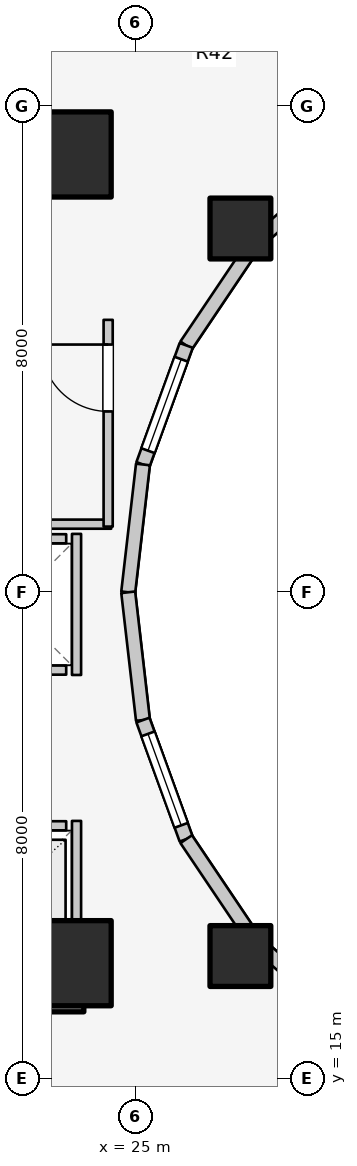
"""IFC4 building model, lengths in metres.
Left out: names, types, materials, properties, quantities, classifications, styles, units other than length and angle.
Written with IfcOpenShell. Run it as: python <this file> out.ifc"""

import sys

from ifc_helpers import new_model, si_unit, direction, frame, frame_2d, origin, origin_2d, place, context, subcontext, project, spatial, rectangle, extrude, element, fill, save


model = new_model("IFC4")
c1 = context("Model", 3, precision=1e-05, world=origin(), true_north=direction((0.0, 1.0)))
c2 = subcontext(c1, "Body", "Model", "MODEL_VIEW")
j1 = project(units=[si_unit("LENGTHUNIT", "METRE"), si_unit("PLANEANGLEUNIT", "RADIAN")], contexts=[c1])
p1 = place(None, origin())
s1 = spatial("IfcSite", under=j1, at=p1, CompositionType="ELEMENT")
p2 = place(p1, origin())
s2 = spatial("IfcBuilding", under=s1, at=p2, CompositionType="ELEMENT")
p3 = place(p2, frame((0.0, 0.0, 40.0)))
s3 = spatial("IfcBuildingStorey", under=s2, at=p3, CompositionType="ELEMENT", Elevation=40.0)
for number, where, z_axis, x_axis in (
    (1, (19.65, 16.55, 0.0), (0.0, 0.0, 1.0), (1.0, 0.0, 0.0)),
    (2, (19.65, 30.35, 0.0), (0.0, 0.0, 1.0), (1.0, 0.0, 0.0)),
):
    element("IfcWall", number, at=place(p3, frame(where, z_axis=z_axis, x_axis=x_axis)), inside=s3, PredefinedType="SHEAR", context=c2, shape_type="SweptSolid", body=[
        extrude(rectangle(XDim=4.5, YDim=0.9, at=frame_2d((2.25, 0.0))), origin(), (0.0, 0.0, 1.0), 3.1),
    ])
for number, where, z_axis, x_axis in (
    (3, (23.9, 16.9, 0.0), (0.0, 0.0, 1.0), (1.0, 0.0, 0.0)),
    (4, (23.9, 30.2, 0.0), (0.0, 0.0, 1.0), (1.0, 0.0, 0.0)),
):
    element("IfcColumn", number, at=place(p3, frame(where, z_axis=z_axis, x_axis=x_axis)), inside=s3, PredefinedType="COLUMN", context=c2, shape_type="SweptSolid", body=[
        extrude(rectangle(XDim=1.4, YDim=1.4, at=origin_2d()), origin(), (0.0, 0.0, 1.0), 3.1),
    ])
for number, where, z_axis, x_axis in (
    (5, (26.725, 28.982, 0.0), (0.0, 0.0, 1.0), (1.0, 0.0, 0.0)),
    (6, (26.725, 17.018, 0.0), (0.0, 0.0, 1.0), (1.0, 0.0, 0.0)),
):
    element("IfcColumn", number, at=place(p3, frame(where, z_axis=z_axis, x_axis=x_axis)), inside=s3, PredefinedType="COLUMN", context=c2, shape_type="SweptSolid", body=[
        extrude(rectangle(XDim=1.0, YDim=1.0, at=origin_2d()), origin(), (0.0, 0.0, 1.0), 3.1),
    ])
p4 = place(p3, frame((28.44, 30.032, 0.0), z_axis=(0.0, 0.0, 1.0), x_axis=(-0.752576694707, -0.658504607869, 0.0)))
e7 = element("IfcWall", 7, at=p4, inside=s3, PredefinedType="STANDARD", context=c2, shape_type="SweptSolid", body=[
    extrude(rectangle(XDim=1.959, YDim=0.23, at=frame_2d((0.98, 0.0))), origin(), (0.0, 0.0, 1.0), 2.16),
])
p5 = place(p3, frame((26.965, 28.742, 0.0), z_axis=(0.0, 0.0, 1.0), x_axis=(-0.558197800898, -0.829707909492, 0.0)))
e8 = element("IfcWall", 8, at=p5, inside=s3, PredefinedType="STANDARD", context=c2, shape_type="SweptSolid", body=[
    extrude(rectangle(XDim=2.027, YDim=0.23, at=frame_2d((1.013, 0.0))), origin(), (0.0, 0.0, 1.0), 2.16),
])
p6 = place(p3, frame((25.834, 27.06, 0.0), z_axis=(0.0, 0.0, 1.0), x_axis=(-0.341423187295, -0.93990968033, 0.0)))
e9 = element("IfcWall", 9, at=p6, inside=s3, PredefinedType="STANDARD", context=c2, shape_type="SweptSolid", body=[
    extrude(rectangle(XDim=2.084, YDim=0.23, at=frame_2d((1.042, 0.0))), origin(), (0.0, 0.0, 1.0), 2.84),
])
p7 = place(p6, frame((0.242, 0.0, 0.85)))
e10 = element("IfcOpeningElement", 10, at=p7, cuts=e9, PredefinedType="OPENING", context=c2, shape_type="SweptSolid", body=[
    extrude(rectangle(XDim=1.6, YDim=1.65, at=frame_2d((0.8, 0.825))), frame((0.0, 0.125, 0.0), z_axis=(0.0, -1.0, 0.0), x_axis=(1.0, 0.0, 0.0)), (0.0, 0.0, 1.0), 0.25),
])
for number, where, z_axis, x_axis in (
    (11, (25.123, 25.102, 0.0), (0.0, 0.0, 1.0), (-0.115, -0.993, 0.0)),
    (12, (24.88, 23.0, 0.0), (0.0, 0.0, 1.0), (0.115, -0.993, 0.0)),
):
    element("IfcWall", number, at=place(p3, frame(where, z_axis=z_axis, x_axis=x_axis)), inside=s3, PredefinedType="STANDARD", context=c2, shape_type="SweptSolid", body=[
        extrude(rectangle(XDim=2.115, YDim=0.23, at=frame_2d((1.058, 0.0))), origin(), (0.0, 0.0, 1.0), 2.84),
    ])
p8 = place(p3, frame((25.123, 20.898, 0.0), z_axis=(0.0, 0.0, 1.0), x_axis=(0.341423187295, -0.93990968033, 0.0)))
e13 = element("IfcWall", 13, at=p8, inside=s3, PredefinedType="STANDARD", context=c2, shape_type="SweptSolid", body=[
    extrude(rectangle(XDim=2.084, YDim=0.23, at=frame_2d((1.042, 0.0))), origin(), (0.0, 0.0, 1.0), 2.84),
])
p9 = place(p8, frame((0.242, 0.0, 0.85)))
e14 = element("IfcOpeningElement", 14, at=p9, cuts=e13, PredefinedType="OPENING", context=c2, shape_type="SweptSolid", body=[
    extrude(rectangle(XDim=1.6, YDim=1.65, at=frame_2d((0.8, 0.825))), frame((0.0, 0.125, 0.0), z_axis=(0.0, -1.0, 0.0), x_axis=(1.0, 0.0, 0.0)), (0.0, 0.0, 1.0), 0.25),
])
p10 = place(p3, frame((25.834, 18.94, 0.0), z_axis=(0.0, 0.0, 1.0), x_axis=(0.558197800898, -0.829707909492, 0.0)))
e15 = element("IfcWall", 15, at=p10, inside=s3, PredefinedType="STANDARD", context=c2, shape_type="SweptSolid", body=[
    extrude(rectangle(XDim=2.027, YDim=0.23, at=frame_2d((1.013, 0.0))), origin(), (0.0, 0.0, 1.0), 2.16),
])
p11 = place(p3, frame((26.965, 17.258, 0.0), z_axis=(0.0, 0.0, 1.0), x_axis=(0.752576694707, -0.658504607869, 0.0)))
e16 = element("IfcWall", 16, at=p11, inside=s3, PredefinedType="STANDARD", context=c2, shape_type="SweptSolid", body=[
    extrude(rectangle(XDim=1.959, YDim=0.23, at=frame_2d((0.98, 0.0))), origin(), (0.0, 0.0, 1.0), 2.16),
])
p12 = place(p3, frame((22.04, 19.16, 0.0), z_axis=(0.0, 0.0, 1.0), x_axis=(1.0, 0.0, 0.0)))
e17 = element("IfcWall", 17, at=p12, inside=s3, PredefinedType="SOLIDWALL", context=c2, shape_type="SweptSolid", body=[
    extrude(rectangle(XDim=1.82, YDim=0.15, at=frame_2d((0.91, 0.0))), origin(), (0.0, 0.0, 1.0), 2.12),
])
p13 = place(p12, frame((0.36, 0.0, 0.0)))
e18 = element("IfcOpeningElement", 18, at=p13, cuts=e17, PredefinedType="OPENING", context=c2, shape_type="SweptSolid", body=[
    extrude(rectangle(XDim=1.1, YDim=2.1, at=frame_2d((0.55, 1.05))), frame((0.0, 0.085, 0.0), z_axis=(0.0, -1.0, 0.0), x_axis=(1.0, 0.0, 0.0)), (0.0, 0.0, 1.0), 0.17),
])
p14 = place(p3, frame((22.04, 17.1, 0.0), z_axis=(0.0, 0.0, 1.0), x_axis=(1.0, 0.0, 0.0)))
e19 = element("IfcWall", 19, at=p14, inside=s3, PredefinedType="SOLIDWALL", context=c2, shape_type="SweptSolid", body=[
    extrude(rectangle(XDim=1.82, YDim=0.15, at=frame_2d((0.91, 0.0))), origin(), (0.0, 0.0, 1.0), 2.12),
])
p15 = place(p3, frame((24.03, 17.02, 0.0), z_axis=(0.0, 0.0, 1.0), x_axis=(0.0, 1.0, 0.0)))
e20 = element("IfcWall", 20, at=p15, inside=s3, PredefinedType="SOLIDWALL", context=c2, shape_type="SweptSolid", body=[
    extrude(rectangle(XDim=2.22, YDim=0.15, at=frame_2d((1.11, 0.0))), origin(), (0.0, 0.0, 1.0), 2.12),
])
for number, where, z_axis, x_axis in (
    (21, (22.04, 21.72, 0.0), (0.0, 0.0, 1.0), (1.0, 0.0, 0.0)),
    (22, (22.04, 23.88, 0.0), (0.0, 0.0, 1.0), (1.0, 0.0, 0.0)),
):
    element("IfcWall", number, at=place(p3, frame(where, z_axis=z_axis, x_axis=x_axis)), inside=s3, PredefinedType="SOLIDWALL", context=c2, shape_type="SweptSolid", body=[
        extrude(rectangle(XDim=1.82, YDim=0.15, at=frame_2d((0.91, 0.0))), origin(), (0.0, 0.0, 1.0), 2.12),
    ])
p16 = place(p3, frame((24.03, 21.64, 0.0), z_axis=(0.0, 0.0, 1.0), x_axis=(0.0, 1.0, 0.0)))
e23 = element("IfcWall", 23, at=p16, inside=s3, PredefinedType="SOLIDWALL", context=c2, shape_type="SweptSolid", body=[
    extrude(rectangle(XDim=2.32, YDim=0.15, at=frame_2d((1.16, 0.0))), origin(), (0.0, 0.0, 1.0), 2.12),
])
p17 = place(p3, frame((19.52, 24.12, 0.0), z_axis=(0.0, 0.0, 1.0), x_axis=(1.0, 0.0, 0.0)))
e24 = element("IfcWall", 24, at=p17, inside=s3, PredefinedType="PARTITIONING", context=c2, shape_type="SweptSolid", body=[
    extrude(rectangle(XDim=5.08, YDim=0.15, at=frame_2d((2.54, 0.0))), origin(), (0.0, 0.0, 1.0), 2.12),
])
p18 = place(p3, frame((24.55, 24.08, 0.0), z_axis=(0.0, 0.0, 1.0), x_axis=(0.0, 1.0, 0.0)))
e25 = element("IfcWall", 25, at=p18, inside=s3, PredefinedType="PARTITIONING", context=c2, shape_type="SweptSolid", body=[
    extrude(rectangle(XDim=3.4, YDim=0.15, at=frame_2d((1.7, 0.0))), origin(), (0.0, 0.0, 1.0), 2.855),
])
p19 = place(p18, frame((1.894, 0.0, 0.0)))
e26 = element("IfcOpeningElement", 26, at=p19, cuts=e25, PredefinedType="OPENING", context=c2, shape_type="SweptSolid", body=[
    extrude(rectangle(XDim=1.1, YDim=2.1, at=frame_2d((0.55, 1.05))), frame((0.0, 0.085, 0.0), z_axis=(0.0, -1.0, 0.0), x_axis=(1.0, 0.0, 0.0)), (0.0, 0.0, 1.0), 0.17),
])
p20 = place(p7, origin())
e27 = element("IfcWindow", 27, at=p20, inside=s3, PartitioningType="SINGLE_PANEL", PredefinedType="WINDOW", context=c2, shape_type="SweptSolid", body=[
    extrude(rectangle(XDim=1.6, YDim=1.65, at=frame_2d((0.8, 0.825))), frame((0.0, 0.03, 0.0), z_axis=(0.0, -1.0, 0.0), x_axis=(1.0, 0.0, 0.0)), (0.0, 0.0, 1.0), 0.06),
])
fill(e10, e27)
p21 = place(p9, origin())
e28 = element("IfcWindow", 28, at=p21, inside=s3, PartitioningType="SINGLE_PANEL", PredefinedType="WINDOW", context=c2, shape_type="SweptSolid", body=[
    extrude(rectangle(XDim=1.6, YDim=1.65, at=frame_2d((0.8, 0.825))), frame((0.0, 0.03, 0.0), z_axis=(0.0, -1.0, 0.0), x_axis=(1.0, 0.0, 0.0)), (0.0, 0.0, 1.0), 0.06),
])
fill(e14, e28)
p22 = place(p19, origin())
e29 = element("IfcDoor", 29, at=p22, inside=s3, OperationType="SINGLE_SWING_RIGHT", PredefinedType="DOOR", context=c2, shape_type="SweptSolid", body=[
    extrude(rectangle(XDim=1.1, YDim=2.1, at=frame_2d((0.55, 1.05))), frame((0.0, 0.025, 0.0), z_axis=(0.0, -1.0, 0.0), x_axis=(1.0, 0.0, 0.0)), (0.0, 0.0, 1.0), 0.05),
])
fill(e26, e29)
save(model, sys.argv[1])
